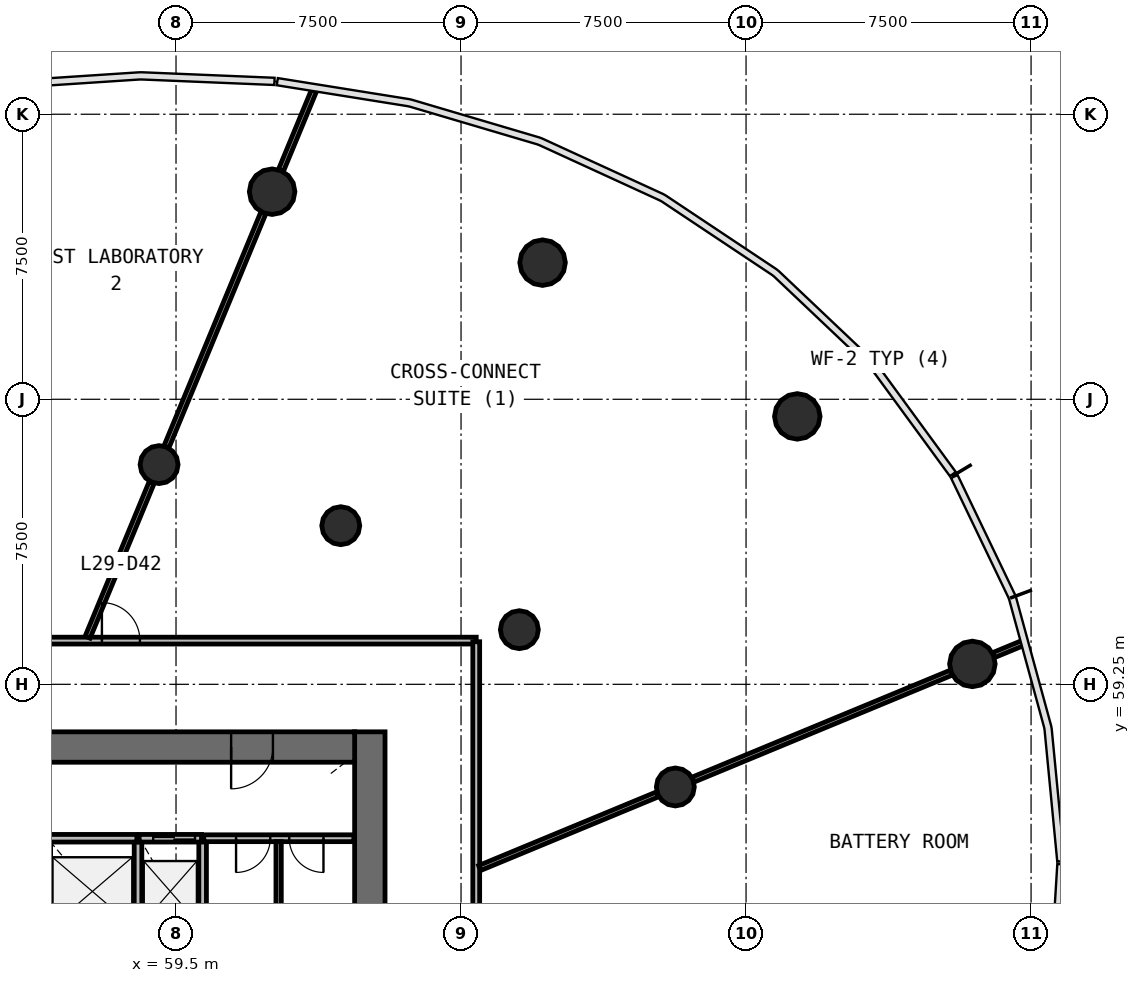
"""IFC4 building model, lengths in metres.
Left out: names, types, materials, properties, quantities, classifications, styles, units other than length and angle.
Written with IfcOpenShell. Run it as: python <this file> out.ifc"""

import sys

from ifc_helpers import new_model, si_unit, direction, frame, frame_2d, origin, origin_2d, place, context, subcontext, project, spatial, rectangle, circle, extrude, source, transform, mapped, element, fill, save


model = new_model("IFC4")
c1 = context("Model", 3, precision=1e-05, world=origin(), true_north=direction((0.0, 1.0)))
c2 = subcontext(c1, "Body", "Model", "MODEL_VIEW")
j1 = project(units=[si_unit("LENGTHUNIT", "METRE"), si_unit("PLANEANGLEUNIT", "RADIAN")], contexts=[c1])
p1 = place(None, origin())
s1 = spatial("IfcSite", under=j1, at=p1, CompositionType="ELEMENT")
p2 = place(p1, origin())
s2 = spatial("IfcBuilding", under=s1, at=p2, CompositionType="ELEMENT")
p3 = place(p2, frame((0.0, 0.0, 124.9)))
s3 = spatial("IfcBuildingStorey", under=s2, at=p3, CompositionType="ELEMENT", Elevation=124.9)
p4 = place(p3, frame((64.6, 38.0, 0.0), z_axis=(0.0, 0.0, 1.0), x_axis=(0.0, 1.0, 0.0)))
e1 = element("IfcWall", 1, at=p4, inside=s3, PredefinedType="SHEAR", context=c2, shape_type="SweptSolid", body=[
    extrude(rectangle(XDim=20.0, YDim=0.8, at=frame_2d((10.0, 0.0))), origin(), (0.0, 0.0, 1.0), 4.1),
])
p5 = place(p4, frame((9.1, 0.0, 0.0)))
e2 = element("IfcOpeningElement", 2, at=p5, cuts=e1, PredefinedType="OPENING", context=c2, shape_type="SweptSolid", body=[
    extrude(rectangle(XDim=1.8, YDim=2.1, at=frame_2d((0.9, 1.05))), frame((0.0, 0.41, 0.0), z_axis=(0.0, -1.0, 0.0), x_axis=(1.0, 0.0, 0.0)), (0.0, 0.0, 1.0), 0.82),
])
p6 = place(p3, frame((64.2, 57.6, 0.0), z_axis=(0.0, 0.0, 1.0), x_axis=(-1.0, 0.0, 0.0)))
e3 = element("IfcWall", 3, at=p6, inside=s3, PredefinedType="SHEAR", context=c2, shape_type="SweptSolid", body=[
    extrude(rectangle(XDim=24.4, YDim=0.8, at=frame_2d((12.2, 0.0))), origin(), (0.0, 0.0, 1.0), 4.1),
])
p7 = place(p6, frame((21.65, 0.0, 0.0)))
e4 = element("IfcOpeningElement", 4, at=p7, cuts=e3, PredefinedType="OPENING", context=c2, shape_type="SweptSolid", body=[
    extrude(rectangle(XDim=1.1, YDim=2.1, at=frame_2d((0.55, 1.05))), frame((0.0, 0.41, 0.0), z_axis=(0.0, -1.0, 0.0), x_axis=(1.0, 0.0, 0.0)), (0.0, 0.0, 1.0), 0.82),
])
p8 = place(p6, frame((2.15, 0.0, 0.0)))
e5 = element("IfcOpeningElement", 5, at=p8, cuts=e3, PredefinedType="OPENING", context=c2, shape_type="SweptSolid", body=[
    extrude(rectangle(XDim=1.1, YDim=2.1, at=frame_2d((0.55, 1.05))), frame((0.0, 0.41, 0.0), z_axis=(0.0, -1.0, 0.0), x_axis=(1.0, 0.0, 0.0)), (0.0, 0.0, 1.0), 0.82),
])
m1 = source(origin(), c2, "Body", "SweptSolid", [
    extrude(circle(Radius=0.6, at=origin_2d()), origin(), (0.0, 0.0, 1.0), 4.1),
])
for number, where, z_axis, x_axis in (
    (6, (80.456, 59.787, 0.0), (0.0, 0.0, 1.0), (1.0, 0.0, 0.0)),
    (7, (75.848, 66.299, 0.0), (0.0, 0.0, 1.0), (1.0, 0.0, 0.0)),
    (8, (69.146, 70.345, 0.0), (0.0, 0.0, 1.0), (1.0, 0.0, 0.0)),
    (9, (62.029, 72.212, 0.0), (0.0, 0.0, 1.0), (1.0, 0.0, 0.0)),
):
    element("IfcColumn", number, at=place(p3, frame(where, z_axis=z_axis, x_axis=x_axis)), inside=s3, PredefinedType="COLUMN", context=c2, shape_type="MappedRepresentation", body=[
        mapped(m1, transform((0.0, 0.0, 0.0), scale=1.0)),
    ])
m2 = source(origin(), c2, "Body", "SweptSolid", [
    extrude(circle(Radius=0.5, at=origin_2d()), origin(), (0.0, 0.0, 1.0), 4.1),
])
for number, where, z_axis, x_axis in (
    (10, (72.639, 56.549, 0.0), (0.0, 0.0, 1.0), (1.0, 0.0, 0.0)),
    (11, (68.535, 60.688, 0.0), (0.0, 0.0, 1.0), (1.0, 0.0, 0.0)),
    (12, (63.835, 63.424, 0.0), (0.0, 0.0, 1.0), (1.0, 0.0, 0.0)),
    (13, (59.055, 65.031, 0.0), (0.0, 0.0, 1.0), (1.0, 0.0, 0.0)),
):
    element("IfcColumn", number, at=place(p3, frame(where, z_axis=z_axis, x_axis=x_axis)), inside=s3, PredefinedType="COLUMN", context=c2, shape_type="MappedRepresentation", body=[
        mapped(m2, transform((0.0, 0.0, 0.0), scale=1.0)),
    ])
for number, where, z_axis, x_axis in (
    (14, (58.5, 52.4, 0.0), (0.0, 0.0, 1.0), (0.0, 1.0, 0.0)),
    (15, (60.2, 52.4, 0.0), (0.0, 0.0, 1.0), (0.0, 1.0, 0.0)),
):
    element("IfcWall", number, at=place(p3, frame(where, z_axis=z_axis, x_axis=x_axis)), inside=s3, PredefinedType="SOLIDWALL", context=c2, shape_type="SweptSolid", body=[
        extrude(rectangle(XDim=2.8, YDim=0.2, at=frame_2d((1.4, 0.0))), origin(), (0.0, 0.0, 1.0), 3.6),
    ])
p9 = place(p3, frame((58.47, 55.2, 0.0), z_axis=(0.0, 0.0, 1.0), x_axis=(-1.0, 0.0, 0.0)))
e16 = element("IfcWall", 16, at=p9, inside=s3, PredefinedType="SOLIDWALL", context=c2, shape_type="SweptSolid", body=[
    extrude(rectangle(XDim=2.34, YDim=0.2, at=frame_2d((1.17, 0.0))), origin(), (0.0, 0.0, 1.0), 3.6),
])
p10 = place(p3, frame((60.17, 55.2, 0.0), z_axis=(0.0, 0.0, 1.0), x_axis=(-1.0, 0.0, 0.0)))
e17 = element("IfcWall", 17, at=p10, inside=s3, PredefinedType="SOLIDWALL", context=c2, shape_type="SweptSolid", body=[
    extrude(rectangle(XDim=1.64, YDim=0.2, at=frame_2d((0.82, 0.0))), origin(), (0.0, 0.0, 1.0), 3.6),
])
p11 = place(p10, frame((0.17, 0.0, 0.0)))
e18 = element("IfcOpeningElement", 18, at=p11, cuts=e17, PredefinedType="OPENING", context=c2, shape_type="SweptSolid", body=[
    extrude(rectangle(XDim=1.1, YDim=2.1, at=frame_2d((0.55, 1.05))), frame((0.0, 0.11, 0.0), z_axis=(0.0, -1.0, 0.0), x_axis=(1.0, 0.0, 0.0)), (0.0, 0.0, 1.0), 0.22),
])
p12 = place(p3, frame((36.6, 60.4, 0.0), z_axis=(0.0, 0.0, 1.0), x_axis=(1.0, 0.0, 0.0)))
e19 = element("IfcWall", 19, at=p12, inside=s3, PredefinedType="PARTITIONING", context=c2, shape_type="SweptSolid", body=[
    extrude(rectangle(XDim=30.8, YDim=0.18, at=frame_2d((15.4, 0.0))), origin(), (0.0, 0.0, 1.0), 2.8),
])
p13 = place(p12, frame((14.85, 0.0, 0.0)))
e20 = element("IfcOpeningElement", 20, at=p13, cuts=e19, PredefinedType="OPENING", context=c2, shape_type="SweptSolid", body=[
    extrude(rectangle(XDim=0.9, YDim=2.1, at=frame_2d((0.45, 1.05))), frame((0.0, 0.1, 0.0), z_axis=(0.0, -1.0, 0.0), x_axis=(1.0, 0.0, 0.0)), (0.0, 0.0, 1.0), 0.2),
])
p14 = place(p12, frame((12.65, 0.0, 0.0)))
e21 = element("IfcOpeningElement", 21, at=p14, cuts=e19, PredefinedType="OPENING", context=c2, shape_type="SweptSolid", body=[
    extrude(rectangle(XDim=0.9, YDim=2.1, at=frame_2d((0.45, 1.05))), frame((0.0, 0.1, 0.0), z_axis=(0.0, -1.0, 0.0), x_axis=(1.0, 0.0, 0.0)), (0.0, 0.0, 1.0), 0.2),
])
p15 = place(p12, frame((20.95, 0.0, 0.0)))
e22 = element("IfcOpeningElement", 22, at=p15, cuts=e19, PredefinedType="OPENING", context=c2, shape_type="SweptSolid", body=[
    extrude(rectangle(XDim=1.0, YDim=2.1, at=frame_2d((0.5, 1.05))), frame((0.0, 0.1, 0.0), z_axis=(0.0, -1.0, 0.0), x_axis=(1.0, 0.0, 0.0)), (0.0, 0.0, 1.0), 0.2),
])
p16 = place(p12, frame((17.35, 0.0, 0.0)))
e23 = element("IfcOpeningElement", 23, at=p16, cuts=e19, PredefinedType="OPENING", context=c2, shape_type="SweptSolid", body=[
    extrude(rectangle(XDim=1.0, YDim=2.1, at=frame_2d((0.5, 1.05))), frame((0.0, 0.1, 0.0), z_axis=(0.0, -1.0, 0.0), x_axis=(1.0, 0.0, 0.0)), (0.0, 0.0, 1.0), 0.2),
])
p17 = place(p3, frame((67.4, 60.37, 0.0), z_axis=(0.0, 0.0, 1.0), x_axis=(0.0, -1.0, 0.0)))
e24 = element("IfcWall", 24, at=p17, inside=s3, PredefinedType="PARTITIONING", context=c2, shape_type="SweptSolid", body=[
    extrude(rectangle(XDim=23.583, YDim=0.18, at=frame_2d((11.791, 0.0))), origin(), (0.0, 0.0, 1.0), 2.8),
])
p18 = place(p17, frame((11.333, 0.0, 0.0)))
e25 = element("IfcOpeningElement", 25, at=p18, cuts=e24, PredefinedType="OPENING", context=c2, shape_type="SweptSolid", body=[
    extrude(rectangle(XDim=1.0, YDim=2.1, at=frame_2d((0.5, 1.05))), frame((0.0, 0.1, 0.0), z_axis=(0.0, -1.0, 0.0), x_axis=(1.0, 0.0, 0.0)), (0.0, 0.0, 1.0), 0.2),
])
p19 = place(p17, frame((9.133, 0.0, 0.0)))
e26 = element("IfcOpeningElement", 26, at=p19, cuts=e24, PredefinedType="OPENING", context=c2, shape_type="SweptSolid", body=[
    extrude(rectangle(XDim=1.0, YDim=2.1, at=frame_2d((0.5, 1.05))), frame((0.0, 0.1, 0.0), z_axis=(0.0, -1.0, 0.0), x_axis=(1.0, 0.0, 0.0)), (0.0, 0.0, 1.0), 0.2),
])
p20 = place(p3, frame((64.18, 55.2, 0.0), z_axis=(0.0, 0.0, 1.0), x_axis=(-1.0, 0.0, 0.0)))
e27 = element("IfcWall", 27, at=p20, inside=s3, PredefinedType="PARTITIONING", context=c2, shape_type="SweptSolid", body=[
    extrude(rectangle(XDim=3.95, YDim=0.18, at=frame_2d((1.975, 0.0))), origin(), (0.0, 0.0, 1.0), 3.6),
])
p21 = place(p20, frame((2.2, 0.0, 0.0)))
e28 = element("IfcOpeningElement", 28, at=p21, cuts=e27, PredefinedType="OPENING", context=c2, shape_type="SweptSolid", body=[
    extrude(rectangle(XDim=0.9, YDim=2.1, at=frame_2d((0.45, 1.05))), frame((0.0, 0.1, 0.0), z_axis=(0.0, -1.0, 0.0), x_axis=(1.0, 0.0, 0.0)), (0.0, 0.0, 1.0), 0.2),
])
p22 = place(p20, frame((0.8, 0.0, 0.0)))
e29 = element("IfcOpeningElement", 29, at=p22, cuts=e27, PredefinedType="OPENING", context=c2, shape_type="SweptSolid", body=[
    extrude(rectangle(XDim=0.9, YDim=2.1, at=frame_2d((0.45, 1.05))), frame((0.0, 0.1, 0.0), z_axis=(0.0, -1.0, 0.0), x_axis=(1.0, 0.0, 0.0)), (0.0, 0.0, 1.0), 0.2),
])
p23 = place(p3, frame((73.106, 56.742, 0.0), z_axis=(0.0, 0.0, 1.0), x_axis=(0.923867037115, 0.382713597528, 0.0)))
e30 = element("IfcWall", 30, at=p23, inside=s3, PredefinedType="PARTITIONING", context=c2, shape_type="SweptSolid", body=[
    extrude(rectangle(XDim=7.35, YDim=0.14, at=frame_2d((3.675, 0.0))), origin(), (0.0, 0.0, 1.0), 2.8),
])
p24 = place(p3, frame((59.248, 65.498, 0.0), z_axis=(0.0, 0.0, 1.0), x_axis=(0.382696989205, 0.923873916968, 0.0)))
e31 = element("IfcWall", 31, at=p24, inside=s3, PredefinedType="PARTITIONING", context=c2, shape_type="SweptSolid", body=[
    extrude(rectangle(XDim=6.663, YDim=0.14, at=frame_2d((3.332, 0.0))), origin(), (0.0, 0.0, 1.0), 2.8),
])
p25 = place(p3, frame((67.49, 54.416, 0.0), z_axis=(0.0, 0.0, 1.0), x_axis=(0.923890025086, 0.382658100067, 0.0)))
e32 = element("IfcWall", 32, at=p25, inside=s3, PredefinedType="PARTITIONING", context=c2, shape_type="SweptSolid", body=[
    extrude(rectangle(XDim=5.068, YDim=0.14, at=frame_2d((2.534, 0.0))), origin(), (0.0, 0.0, 1.0), 2.8),
])
p26 = place(p3, frame((57.174, 60.49, 0.0), z_axis=(0.0, 0.0, 1.0), x_axis=(0.382672831764, 0.923883923353, 0.0)))
e33 = element("IfcWall", 33, at=p26, inside=s3, PredefinedType="PARTITIONING", context=c2, shape_type="SweptSolid", body=[
    extrude(rectangle(XDim=4.41, YDim=0.14, at=frame_2d((2.205, 0.0))), origin(), (0.0, 0.0, 1.0), 2.8),
])
p27 = place(p3, frame((62.2, 52.4, 0.0), z_axis=(0.0, 0.0, 1.0), x_axis=(0.0, 1.0, 0.0)))
e34 = element("IfcWall", 34, at=p27, inside=s3, PredefinedType="PARTITIONING", context=c2, shape_type="SweptSolid", body=[
    extrude(rectangle(XDim=2.71, YDim=0.14, at=frame_2d((1.355, 0.0))), origin(), (0.0, 0.0, 1.0), 2.8),
])
p28 = place(p3, frame((62.26, 72.771, 0.0), z_axis=(0.0, 0.0, 1.0), x_axis=(0.382697386614, 0.923873752348, 0.0)))
e35 = element("IfcWall", 35, at=p28, inside=s3, PredefinedType="PARTITIONING", context=c2, shape_type="SweptSolid", body=[
    extrude(rectangle(XDim=2.288, YDim=0.14, at=frame_2d((1.144, 0.0))), origin(), (0.0, 0.0, 1.0), 2.8),
])
p29 = place(p3, frame((81.014, 60.018, 0.0), z_axis=(0.0, 0.0, 1.0), x_axis=(0.923907241147, 0.382616530949, 0.0)))
e36 = element("IfcWall", 36, at=p29, inside=s3, PredefinedType="PARTITIONING", context=c2, shape_type="SweptSolid", body=[
    extrude(rectangle(XDim=0.842, YDim=0.14, at=frame_2d((0.421, 0.0))), origin(), (0.0, 0.0, 1.0), 2.8),
])
m3 = source(origin(), c2, "Body", "SweptSolid", [
    extrude(rectangle(XDim=1.1, YDim=2.1, at=frame_2d((0.55, 1.05))), frame((0.0, 0.025, 0.0), z_axis=(0.0, -1.0, 0.0), x_axis=(1.0, 0.0, 0.0)), (0.0, 0.0, 1.0), 0.05),
])
p30 = place(p11, origin())
e37 = element("IfcDoor", 37, at=p30, inside=s3, OperationType="DOUBLE_DOOR_SLIDING", PredefinedType="USERDEFINED", context=c2, shape_type="MappedRepresentation", body=[
    mapped(m3, transform((0.0, 0.0, 0.0), scale=1.0)),
])
fill(e18, e37)
m4 = source(origin(), c2, "Body", "SweptSolid", [
    extrude(rectangle(XDim=1.1, YDim=2.1, at=frame_2d((0.55, 1.05))), frame((0.0, 0.025, 0.0), z_axis=(0.0, -1.0, 0.0), x_axis=(1.0, 0.0, 0.0)), (0.0, 0.0, 1.0), 0.05),
])
p31 = place(p8, origin())
e38 = element("IfcDoor", 38, at=p31, inside=s3, OperationType="SINGLE_SWING_RIGHT", PredefinedType="DOOR", context=c2, shape_type="MappedRepresentation", body=[
    mapped(m4, transform((0.0, 0.0, 0.0), scale=1.0)),
])
fill(e5, e38)
m5 = source(origin(), c2, "Body", "SweptSolid", [
    extrude(rectangle(XDim=1.0, YDim=2.1, at=frame_2d((0.5, 1.05))), frame((0.0, 0.025, 0.0), z_axis=(0.0, -1.0, 0.0), x_axis=(1.0, 0.0, 0.0)), (0.0, 0.0, 1.0), 0.05),
])
p32 = place(p15, origin())
e39 = element("IfcDoor", 39, at=p32, inside=s3, OperationType="SINGLE_SWING_LEFT", PredefinedType="DOOR", context=c2, shape_type="MappedRepresentation", body=[
    mapped(m5, transform((0.0, 0.0, 0.0), scale=1.0)),
])
fill(e22, e39)
m6 = source(origin(), c2, "Body", "SweptSolid", [
    extrude(rectangle(XDim=0.9, YDim=2.1, at=frame_2d((0.45, 1.05))), frame((0.0, 0.025, 0.0), z_axis=(0.0, -1.0, 0.0), x_axis=(1.0, 0.0, 0.0)), (0.0, 0.0, 1.0), 0.05),
])
p33 = place(p21, origin())
e40 = element("IfcDoor", 40, at=p33, inside=s3, OperationType="SINGLE_SWING_RIGHT", PredefinedType="DOOR", context=c2, shape_type="MappedRepresentation", body=[
    mapped(m6, transform((0.0, 0.0, 0.0), scale=1.0)),
])
fill(e28, e40)
p34 = place(p22, origin())
e41 = element("IfcDoor", 41, at=p34, inside=s3, OperationType="SINGLE_SWING_LEFT", PredefinedType="DOOR", context=c2, shape_type="MappedRepresentation", body=[
    mapped(m6, transform((0.0, 0.0, 0.0), scale=1.0)),
])
fill(e29, e41)
save(model, sys.argv[1])
